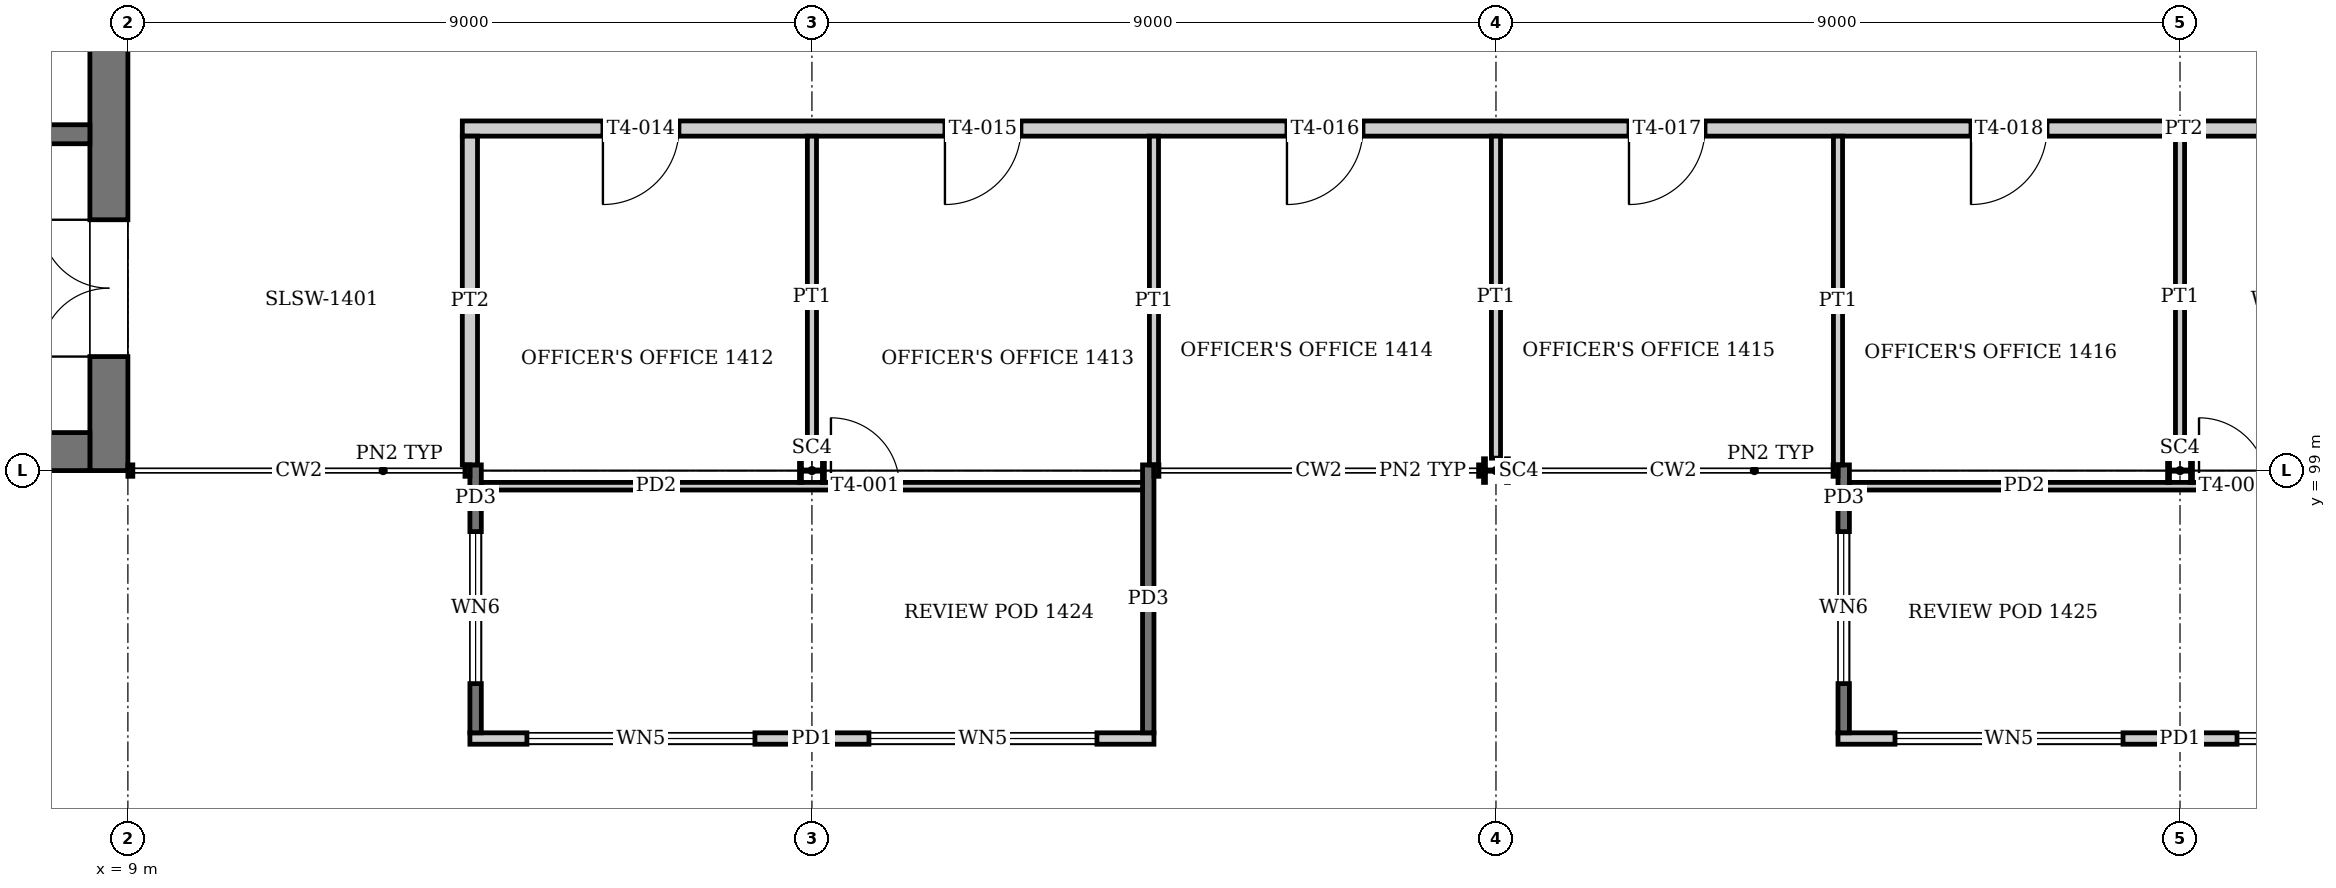
"""IFC4 building model, lengths in metres.
Left out: names, types, materials, properties, quantities, classifications, styles, units other than length and angle.
Written with IfcOpenShell. Run it as: python <this file> out.ifc"""

import sys

from ifc_helpers import new_model, si_unit, direction, frame, frame_2d, origin, origin_2d, place, context, subcontext, project, spatial, rectangle, i_section, extrude, element, fill, save


model = new_model("IFC4")
c1 = context("Model", 3, precision=1e-05, world=origin(), true_north=direction((0.0, 1.0)))
c2 = subcontext(c1, "Body", "Model", "MODEL_VIEW")
j1 = project(units=[si_unit("LENGTHUNIT", "METRE"), si_unit("PLANEANGLEUNIT", "RADIAN")], contexts=[c1])
p1 = place(None, origin())
s1 = spatial("IfcSite", under=j1, at=p1, CompositionType="ELEMENT")
p2 = place(p1, origin())
s2 = spatial("IfcBuilding", under=s1, at=p2, CompositionType="ELEMENT")
p3 = place(p2, frame((0.0, 0.0, 59.2)))
s3 = spatial("IfcBuildingStorey", under=s2, at=p3, CompositionType="ELEMENT", Elevation=59.2)
for number, where, z_axis, x_axis in (
    (1, (18.0, 99.0, 0.0), (0.0, 0.0, 1.0), (0.0, 1.0, 0.0)),
    (2, (27.0, 99.0, 0.0), (0.0, 0.0, 1.0), (0.0, 1.0, 0.0)),
    (3, (36.0, 99.0, 0.0), (0.0, 0.0, 1.0), (0.0, 1.0, 0.0)),
):
    element("IfcColumn", number, at=place(p3, frame(where, z_axis=z_axis, x_axis=x_axis)), inside=s3, PredefinedType="COLUMN", context=c2, shape_type="SweptSolid", body=[
        extrude(i_section(OverallWidth=0.311, OverallDepth=0.327, WebThickness=0.016, FlangeThickness=0.025, at=origin_2d()), origin(), (0.0, 0.0, 1.0), 4.0),
    ])
p4 = place(p3, frame((8.75, 99.0, 0.0), z_axis=(0.0, 0.0, 1.0), x_axis=(0.0, 1.0, 0.0)))
e4 = element("IfcWall", 4, at=p4, inside=s3, PredefinedType="SHEAR", context=c2, shape_type="SweptSolid", body=[
    extrude(rectangle(XDim=18.0, YDim=0.5, at=frame_2d((9.0, 0.0))), origin(), (0.0, 0.0, 1.0), 4.0),
])
p5 = place(p4, frame((1.5, 0.0, 0.0)))
e5 = element("IfcOpeningElement", 5, at=p5, cuts=e4, PredefinedType="OPENING", context=c2, shape_type="SweptSolid", body=[
    extrude(rectangle(XDim=1.8, YDim=2.1, at=frame_2d((0.9, 1.05))), frame((0.0, 0.26, 0.0), z_axis=(0.0, -1.0, 0.0), x_axis=(1.0, 0.0, 0.0)), (0.0, 0.0, 1.0), 0.52),
])
p6 = place(p4, frame((14.7, 0.0, 0.0)))
e6 = element("IfcOpeningElement", 6, at=p6, cuts=e4, PredefinedType="OPENING", context=c2, shape_type="SweptSolid", body=[
    extrude(rectangle(XDim=1.8, YDim=2.1, at=frame_2d((0.9, 1.05))), frame((0.0, 0.26, 0.0), z_axis=(0.0, -1.0, 0.0), x_axis=(1.0, 0.0, 0.0)), (0.0, 0.0, 1.0), 0.52),
])
p7 = place(p4, frame((7.5, 0.0, 0.0)))
e7 = element("IfcOpeningElement", 7, at=p7, cuts=e4, PredefinedType="OPENING", context=c2, shape_type="SweptSolid", body=[
    extrude(rectangle(XDim=1.8, YDim=2.1, at=frame_2d((0.9, 1.05))), frame((0.0, 0.26, 0.0), z_axis=(0.0, -1.0, 0.0), x_axis=(1.0, 0.0, 0.0)), (0.0, 0.0, 1.0), 0.52),
])
p8 = place(p3, frame((0.5, 99.25, 0.0), z_axis=(0.0, 0.0, 1.0), x_axis=(1.0, 0.0, 0.0)))
e8 = element("IfcWall", 8, at=p8, inside=s3, PredefinedType="SHEAR", context=c2, shape_type="SweptSolid", body=[
    extrude(rectangle(XDim=8.0, YDim=0.5, at=frame_2d((4.0, 0.0))), origin(), (0.0, 0.0, 1.0), 4.0),
])
p9 = place(p3, frame((13.5, 95.475, 0.0), z_axis=(0.0, 0.0, 1.0), x_axis=(1.0, 0.0, 0.0)))
e9 = element("IfcWall", 9, at=p9, inside=s3, PredefinedType="SOLIDWALL", context=c2, shape_type="SweptSolid", body=[
    extrude(rectangle(XDim=9.0, YDim=0.15, at=frame_2d((4.5, 0.0))), origin(), (0.0, 0.0, 1.0), 2.6),
])
p10 = place(p9, frame((0.75, 0.0, 0.9)))
e10 = element("IfcOpeningElement", 10, at=p10, cuts=e9, PredefinedType="OPENING", context=c2, shape_type="SweptSolid", body=[
    extrude(rectangle(XDim=3.0, YDim=1.4, at=frame_2d((1.5, 0.7))), frame((0.0, 0.085, 0.0), z_axis=(0.0, -1.0, 0.0), x_axis=(1.0, 0.0, 0.0)), (0.0, 0.0, 1.0), 0.17),
])
p11 = place(p9, frame((5.25, 0.0, 0.9)))
e11 = element("IfcOpeningElement", 11, at=p11, cuts=e9, PredefinedType="OPENING", context=c2, shape_type="SweptSolid", body=[
    extrude(rectangle(XDim=3.0, YDim=1.4, at=frame_2d((1.5, 0.7))), frame((0.0, 0.085, 0.0), z_axis=(0.0, -1.0, 0.0), x_axis=(1.0, 0.0, 0.0)), (0.0, 0.0, 1.0), 0.17),
])
p12 = place(p3, frame((13.575, 95.55, -0.15), z_axis=(0.0, 0.0, 1.0), x_axis=(0.0, 1.0, 0.0)))
e12 = element("IfcWall", 12, at=p12, inside=s3, PredefinedType="SOLIDWALL", context=c2, shape_type="SweptSolid", body=[
    extrude(rectangle(XDim=3.525, YDim=0.15, at=frame_2d((1.762, 0.0))), origin(), (0.0, 0.0, 1.0), 2.75),
])
p13 = place(p12, frame((0.647, 0.0, 1.05)))
e13 = element("IfcOpeningElement", 13, at=p13, cuts=e12, PredefinedType="OPENING", context=c2, shape_type="SweptSolid", body=[
    extrude(rectangle(XDim=2.0, YDim=1.4, at=frame_2d((1.0, 0.7))), frame((0.0, 0.085, 0.0), z_axis=(0.0, -1.0, 0.0), x_axis=(1.0, 0.0, 0.0)), (0.0, 0.0, 1.0), 0.17),
])
p14 = place(p3, frame((22.425, 95.55, -0.15), z_axis=(0.0, 0.0, 1.0), x_axis=(0.0, 1.0, 0.0)))
e14 = element("IfcWall", 14, at=p14, inside=s3, PredefinedType="SOLIDWALL", context=c2, shape_type="SweptSolid", body=[
    extrude(rectangle(XDim=3.525, YDim=0.15, at=frame_2d((1.762, 0.0))), origin(), (0.0, 0.0, 1.0), 2.75),
])
p15 = place(p3, frame((13.65, 98.794, 0.0), z_axis=(0.0, 0.0, 1.0), x_axis=(1.0, 0.0, 0.0)))
e15 = element("IfcWall", 15, at=p15, inside=s3, PredefinedType="PARTITIONING", context=c2, shape_type="SweptSolid", body=[
    extrude(rectangle(XDim=8.7, YDim=0.1, at=frame_2d((4.35, 0.0))), origin(), (0.0, 0.0, 1.0), 2.6),
])
p16 = place(p15, frame((4.6, 0.0, 0.0)))
e16 = element("IfcOpeningElement", 16, at=p16, cuts=e15, PredefinedType="OPENING", context=c2, shape_type="SweptSolid", body=[
    extrude(rectangle(XDim=0.9, YDim=2.1, at=frame_2d((0.45, 1.05))), frame((0.0, 0.06, 0.0), z_axis=(0.0, -1.0, 0.0), x_axis=(1.0, 0.0, 0.0)), (0.0, 0.0, 1.0), 0.12),
])
p17 = place(p3, frame((31.5, 95.475, 0.0), z_axis=(0.0, 0.0, 1.0), x_axis=(1.0, 0.0, 0.0)))
e17 = element("IfcWall", 17, at=p17, inside=s3, PredefinedType="SOLIDWALL", context=c2, shape_type="SweptSolid", body=[
    extrude(rectangle(XDim=9.0, YDim=0.15, at=frame_2d((4.5, 0.0))), origin(), (0.0, 0.0, 1.0), 2.6),
])
p18 = place(p17, frame((0.75, 0.0, 0.9)))
e18 = element("IfcOpeningElement", 18, at=p18, cuts=e17, PredefinedType="OPENING", context=c2, shape_type="SweptSolid", body=[
    extrude(rectangle(XDim=3.0, YDim=1.4, at=frame_2d((1.5, 0.7))), frame((0.0, 0.085, 0.0), z_axis=(0.0, -1.0, 0.0), x_axis=(1.0, 0.0, 0.0)), (0.0, 0.0, 1.0), 0.17),
])
p19 = place(p17, frame((5.25, 0.0, 0.9)))
e19 = element("IfcOpeningElement", 19, at=p19, cuts=e17, PredefinedType="OPENING", context=c2, shape_type="SweptSolid", body=[
    extrude(rectangle(XDim=3.0, YDim=1.4, at=frame_2d((1.5, 0.7))), frame((0.0, 0.085, 0.0), z_axis=(0.0, -1.0, 0.0), x_axis=(1.0, 0.0, 0.0)), (0.0, 0.0, 1.0), 0.17),
])
p20 = place(p3, frame((31.575, 95.55, -0.15), z_axis=(0.0, 0.0, 1.0), x_axis=(0.0, 1.0, 0.0)))
e20 = element("IfcWall", 20, at=p20, inside=s3, PredefinedType="SOLIDWALL", context=c2, shape_type="SweptSolid", body=[
    extrude(rectangle(XDim=3.525, YDim=0.15, at=frame_2d((1.762, 0.0))), origin(), (0.0, 0.0, 1.0), 2.75),
])
p21 = place(p20, frame((0.647, 0.0, 1.05)))
e21 = element("IfcOpeningElement", 21, at=p21, cuts=e20, PredefinedType="OPENING", context=c2, shape_type="SweptSolid", body=[
    extrude(rectangle(XDim=2.0, YDim=1.4, at=frame_2d((1.0, 0.7))), frame((0.0, 0.085, 0.0), z_axis=(0.0, -1.0, 0.0), x_axis=(1.0, 0.0, 0.0)), (0.0, 0.0, 1.0), 0.17),
])
p22 = place(p3, frame((31.65, 98.794, 0.0), z_axis=(0.0, 0.0, 1.0), x_axis=(1.0, 0.0, 0.0)))
e22 = element("IfcWall", 22, at=p22, inside=s3, PredefinedType="PARTITIONING", context=c2, shape_type="SweptSolid", body=[
    extrude(rectangle(XDim=8.7, YDim=0.1, at=frame_2d((4.35, 0.0))), origin(), (0.0, 0.0, 1.0), 2.6),
])
p23 = place(p22, frame((4.6, 0.0, 0.0)))
e23 = element("IfcOpeningElement", 23, at=p23, cuts=e22, PredefinedType="OPENING", context=c2, shape_type="SweptSolid", body=[
    extrude(rectangle(XDim=0.9, YDim=2.1, at=frame_2d((0.45, 1.05))), frame((0.0, 0.06, 0.0), z_axis=(0.0, -1.0, 0.0), x_axis=(1.0, 0.0, 0.0)), (0.0, 0.0, 1.0), 0.12),
])
p24 = place(p3, frame((8.5, 103.425, 0.0), z_axis=(0.0, 0.0, 1.0), x_axis=(-1.0, 0.0, 0.0)))
e24 = element("IfcWall", 24, at=p24, inside=s3, PredefinedType="SOLIDWALL", context=c2, shape_type="SweptSolid", body=[
    extrude(rectangle(XDim=8.0, YDim=0.25, at=frame_2d((4.0, 0.0))), origin(), (0.0, 0.0, 1.0), 3.75),
])
p25 = place(p3, frame((13.4, 103.5, 0.0), z_axis=(0.0, 0.0, 1.0), x_axis=(1.0, 0.0, 0.0)))
e25 = element("IfcWall", 25, at=p25, inside=s3, PredefinedType="PARTITIONING", context=c2, shape_type="SweptSolid", body=[
    extrude(rectangle(XDim=27.2, YDim=0.2, at=frame_2d((13.6, 0.0))), origin(), (0.0, 0.0, 1.0), 3.05),
])
p26 = place(p25, frame((1.85, 0.0, 0.0)))
e26 = element("IfcOpeningElement", 26, at=p26, cuts=e25, PredefinedType="OPENING", context=c2, shape_type="SweptSolid", body=[
    extrude(rectangle(XDim=1.0, YDim=2.1, at=frame_2d((0.5, 1.05))), frame((0.0, 0.11, 0.0), z_axis=(0.0, -1.0, 0.0), x_axis=(1.0, 0.0, 0.0)), (0.0, 0.0, 1.0), 0.22),
])
p27 = place(p25, frame((6.35, 0.0, 0.0)))
e27 = element("IfcOpeningElement", 27, at=p27, cuts=e25, PredefinedType="OPENING", context=c2, shape_type="SweptSolid", body=[
    extrude(rectangle(XDim=1.0, YDim=2.1, at=frame_2d((0.5, 1.05))), frame((0.0, 0.11, 0.0), z_axis=(0.0, -1.0, 0.0), x_axis=(1.0, 0.0, 0.0)), (0.0, 0.0, 1.0), 0.22),
])
p28 = place(p25, frame((10.85, 0.0, 0.0)))
e28 = element("IfcOpeningElement", 28, at=p28, cuts=e25, PredefinedType="OPENING", context=c2, shape_type="SweptSolid", body=[
    extrude(rectangle(XDim=1.0, YDim=2.1, at=frame_2d((0.5, 1.05))), frame((0.0, 0.11, 0.0), z_axis=(0.0, -1.0, 0.0), x_axis=(1.0, 0.0, 0.0)), (0.0, 0.0, 1.0), 0.22),
])
p29 = place(p25, frame((15.35, 0.0, 0.0)))
e29 = element("IfcOpeningElement", 29, at=p29, cuts=e25, PredefinedType="OPENING", context=c2, shape_type="SweptSolid", body=[
    extrude(rectangle(XDim=1.0, YDim=2.1, at=frame_2d((0.5, 1.05))), frame((0.0, 0.11, 0.0), z_axis=(0.0, -1.0, 0.0), x_axis=(1.0, 0.0, 0.0)), (0.0, 0.0, 1.0), 0.22),
])
p30 = place(p25, frame((19.85, 0.0, 0.0)))
e30 = element("IfcOpeningElement", 30, at=p30, cuts=e25, PredefinedType="OPENING", context=c2, shape_type="SweptSolid", body=[
    extrude(rectangle(XDim=1.0, YDim=2.1, at=frame_2d((0.5, 1.05))), frame((0.0, 0.11, 0.0), z_axis=(0.0, -1.0, 0.0), x_axis=(1.0, 0.0, 0.0)), (0.0, 0.0, 1.0), 0.22),
])
p31 = place(p25, frame((24.45, 0.0, 0.0)))
e31 = element("IfcOpeningElement", 31, at=p31, cuts=e25, PredefinedType="OPENING", context=c2, shape_type="SweptSolid", body=[
    extrude(rectangle(XDim=0.8, YDim=2.1, at=frame_2d((0.4, 1.05))), frame((0.0, 0.11, 0.0), z_axis=(0.0, -1.0, 0.0), x_axis=(1.0, 0.0, 0.0)), (0.0, 0.0, 1.0), 0.22),
])
p32 = place(p3, frame((13.5, 99.075, 0.0), z_axis=(0.0, 0.0, 1.0), x_axis=(0.0, 1.0, 0.0)))
e32 = element("IfcWall", 32, at=p32, inside=s3, PredefinedType="PARTITIONING", context=c2, shape_type="SweptSolid", body=[
    extrude(rectangle(XDim=4.325, YDim=0.2, at=frame_2d((2.163, 0.0))), origin(), (0.0, 0.0, 1.0), 3.05),
])
p33 = place(p3, frame((18.0, 99.164, 0.0), z_axis=(0.0, 0.0, 1.0), x_axis=(0.0, 1.0, 0.0)))
e33 = element("IfcWall", 33, at=p33, inside=s3, PredefinedType="PARTITIONING", context=c2, shape_type="SweptSolid", body=[
    extrude(rectangle(XDim=4.236, YDim=0.12, at=frame_2d((2.118, 0.0))), origin(), (0.0, 0.0, 1.0), 3.05),
])
p34 = place(p3, frame((22.5, 99.075, 0.0), z_axis=(0.0, 0.0, 1.0), x_axis=(0.0, 1.0, 0.0)))
e34 = element("IfcWall", 34, at=p34, inside=s3, PredefinedType="PARTITIONING", context=c2, shape_type="SweptSolid", body=[
    extrude(rectangle(XDim=4.325, YDim=0.12, at=frame_2d((2.163, 0.0))), origin(), (0.0, 0.0, 1.0), 3.05),
])
p35 = place(p3, frame((27.0, 99.164, 0.0), z_axis=(0.0, 0.0, 1.0), x_axis=(0.0, 1.0, 0.0)))
e35 = element("IfcWall", 35, at=p35, inside=s3, PredefinedType="PARTITIONING", context=c2, shape_type="SweptSolid", body=[
    extrude(rectangle(XDim=4.236, YDim=0.12, at=frame_2d((2.118, 0.0))), origin(), (0.0, 0.0, 1.0), 3.05),
])
p36 = place(p3, frame((31.5, 99.075, 0.0), z_axis=(0.0, 0.0, 1.0), x_axis=(0.0, 1.0, 0.0)))
e36 = element("IfcWall", 36, at=p36, inside=s3, PredefinedType="PARTITIONING", context=c2, shape_type="SweptSolid", body=[
    extrude(rectangle(XDim=4.325, YDim=0.12, at=frame_2d((2.163, 0.0))), origin(), (0.0, 0.0, 1.0), 3.05),
])
p37 = place(p3, frame((36.0, 99.164, 0.0), z_axis=(0.0, 0.0, 1.0), x_axis=(0.0, 1.0, 0.0)))
e37 = element("IfcWall", 37, at=p37, inside=s3, PredefinedType="PARTITIONING", context=c2, shape_type="SweptSolid", body=[
    extrude(rectangle(XDim=4.236, YDim=0.12, at=frame_2d((2.118, 0.0))), origin(), (0.0, 0.0, 1.0), 3.05),
])
p38 = place(p10, origin())
e38 = element("IfcWindow", 38, at=p38, inside=s3, PartitioningType="SINGLE_PANEL", PredefinedType="WINDOW", context=c2, shape_type="SweptSolid", body=[
    extrude(rectangle(XDim=3.0, YDim=1.4, at=frame_2d((1.5, 0.7))), frame((0.0, 0.03, 0.0), z_axis=(0.0, -1.0, 0.0), x_axis=(1.0, 0.0, 0.0)), (0.0, 0.0, 1.0), 0.06),
])
fill(e10, e38)
p39 = place(p11, origin())
e39 = element("IfcWindow", 39, at=p39, inside=s3, PartitioningType="SINGLE_PANEL", PredefinedType="WINDOW", context=c2, shape_type="SweptSolid", body=[
    extrude(rectangle(XDim=3.0, YDim=1.4, at=frame_2d((1.5, 0.7))), frame((0.0, 0.03, 0.0), z_axis=(0.0, -1.0, 0.0), x_axis=(1.0, 0.0, 0.0)), (0.0, 0.0, 1.0), 0.06),
])
fill(e11, e39)
p40 = place(p13, origin())
e40 = element("IfcWindow", 40, at=p40, inside=s3, PartitioningType="SINGLE_PANEL", PredefinedType="WINDOW", context=c2, shape_type="SweptSolid", body=[
    extrude(rectangle(XDim=2.0, YDim=1.4, at=frame_2d((1.0, 0.7))), frame((0.0, 0.03, 0.0), z_axis=(0.0, -1.0, 0.0), x_axis=(1.0, 0.0, 0.0)), (0.0, 0.0, 1.0), 0.06),
])
fill(e13, e40)
p41 = place(p16, origin())
e41 = element("IfcDoor", 41, at=p41, inside=s3, OperationType="SINGLE_SWING_LEFT", PredefinedType="DOOR", context=c2, shape_type="SweptSolid", body=[
    extrude(rectangle(XDim=0.9, YDim=2.1, at=frame_2d((0.45, 1.05))), frame((0.0, 0.025, 0.0), z_axis=(0.0, -1.0, 0.0), x_axis=(1.0, 0.0, 0.0)), (0.0, 0.0, 1.0), 0.05),
])
fill(e16, e41)
p42 = place(p18, origin())
e42 = element("IfcWindow", 42, at=p42, inside=s3, PartitioningType="SINGLE_PANEL", PredefinedType="WINDOW", context=c2, shape_type="SweptSolid", body=[
    extrude(rectangle(XDim=3.0, YDim=1.4, at=frame_2d((1.5, 0.7))), frame((0.0, 0.03, 0.0), z_axis=(0.0, -1.0, 0.0), x_axis=(1.0, 0.0, 0.0)), (0.0, 0.0, 1.0), 0.06),
])
fill(e18, e42)
p43 = place(p19, origin())
e43 = element("IfcWindow", 43, at=p43, inside=s3, PartitioningType="SINGLE_PANEL", PredefinedType="WINDOW", context=c2, shape_type="SweptSolid", body=[
    extrude(rectangle(XDim=3.0, YDim=1.4, at=frame_2d((1.5, 0.7))), frame((0.0, 0.03, 0.0), z_axis=(0.0, -1.0, 0.0), x_axis=(1.0, 0.0, 0.0)), (0.0, 0.0, 1.0), 0.06),
])
fill(e19, e43)
p44 = place(p21, origin())
e44 = element("IfcWindow", 44, at=p44, inside=s3, PartitioningType="SINGLE_PANEL", PredefinedType="WINDOW", context=c2, shape_type="SweptSolid", body=[
    extrude(rectangle(XDim=2.0, YDim=1.4, at=frame_2d((1.0, 0.7))), frame((0.0, 0.03, 0.0), z_axis=(0.0, -1.0, 0.0), x_axis=(1.0, 0.0, 0.0)), (0.0, 0.0, 1.0), 0.06),
])
fill(e21, e44)
p45 = place(p23, origin())
e45 = element("IfcDoor", 45, at=p45, inside=s3, OperationType="SINGLE_SWING_LEFT", PredefinedType="DOOR", context=c2, shape_type="SweptSolid", body=[
    extrude(rectangle(XDim=0.9, YDim=2.1, at=frame_2d((0.45, 1.05))), frame((0.0, 0.025, 0.0), z_axis=(0.0, -1.0, 0.0), x_axis=(1.0, 0.0, 0.0)), (0.0, 0.0, 1.0), 0.05),
])
fill(e23, e45)
p46 = place(p26, frame((1.0, 0.0, 0.0), z_axis=(0.0, 0.0, 1.0), x_axis=(-1.0, 0.0, 0.0)))
e46 = element("IfcDoor", 46, at=p46, inside=s3, OperationType="SINGLE_SWING_RIGHT", PredefinedType="DOOR", context=c2, shape_type="SweptSolid", body=[
    extrude(rectangle(XDim=1.0, YDim=2.1, at=frame_2d((0.5, 1.05))), frame((0.0, 0.025, 0.0), z_axis=(0.0, -1.0, 0.0), x_axis=(1.0, 0.0, 0.0)), (0.0, 0.0, 1.0), 0.05),
])
fill(e26, e46)
p47 = place(p27, frame((1.0, 0.0, 0.0), z_axis=(0.0, 0.0, 1.0), x_axis=(-1.0, 0.0, 0.0)))
e47 = element("IfcDoor", 47, at=p47, inside=s3, OperationType="SINGLE_SWING_RIGHT", PredefinedType="DOOR", context=c2, shape_type="SweptSolid", body=[
    extrude(rectangle(XDim=1.0, YDim=2.1, at=frame_2d((0.5, 1.05))), frame((0.0, 0.025, 0.0), z_axis=(0.0, -1.0, 0.0), x_axis=(1.0, 0.0, 0.0)), (0.0, 0.0, 1.0), 0.05),
])
fill(e27, e47)
p48 = place(p28, frame((1.0, 0.0, 0.0), z_axis=(0.0, 0.0, 1.0), x_axis=(-1.0, 0.0, 0.0)))
e48 = element("IfcDoor", 48, at=p48, inside=s3, OperationType="SINGLE_SWING_RIGHT", PredefinedType="DOOR", context=c2, shape_type="SweptSolid", body=[
    extrude(rectangle(XDim=1.0, YDim=2.1, at=frame_2d((0.5, 1.05))), frame((0.0, 0.025, 0.0), z_axis=(0.0, -1.0, 0.0), x_axis=(1.0, 0.0, 0.0)), (0.0, 0.0, 1.0), 0.05),
])
fill(e28, e48)
p49 = place(p29, frame((1.0, 0.0, 0.0), z_axis=(0.0, 0.0, 1.0), x_axis=(-1.0, 0.0, 0.0)))
e49 = element("IfcDoor", 49, at=p49, inside=s3, OperationType="SINGLE_SWING_RIGHT", PredefinedType="DOOR", context=c2, shape_type="SweptSolid", body=[
    extrude(rectangle(XDim=1.0, YDim=2.1, at=frame_2d((0.5, 1.05))), frame((0.0, 0.025, 0.0), z_axis=(0.0, -1.0, 0.0), x_axis=(1.0, 0.0, 0.0)), (0.0, 0.0, 1.0), 0.05),
])
fill(e29, e49)
p50 = place(p30, frame((1.0, 0.0, 0.0), z_axis=(0.0, 0.0, 1.0), x_axis=(-1.0, 0.0, 0.0)))
e50 = element("IfcDoor", 50, at=p50, inside=s3, OperationType="SINGLE_SWING_RIGHT", PredefinedType="DOOR", context=c2, shape_type="SweptSolid", body=[
    extrude(rectangle(XDim=1.0, YDim=2.1, at=frame_2d((0.5, 1.05))), frame((0.0, 0.025, 0.0), z_axis=(0.0, -1.0, 0.0), x_axis=(1.0, 0.0, 0.0)), (0.0, 0.0, 1.0), 0.05),
])
fill(e30, e50)
p51 = place(p5, origin())
e51 = element("IfcDoor", 51, at=p51, inside=s3, OperationType="DOUBLE_DOOR_SINGLE_SWING", PredefinedType="DOOR", context=c2, shape_type="SweptSolid", body=[
    extrude(rectangle(XDim=1.8, YDim=2.1, at=frame_2d((0.9, 1.05))), frame((0.0, 0.025, 0.0), z_axis=(0.0, -1.0, 0.0), x_axis=(1.0, 0.0, 0.0)), (0.0, 0.0, 1.0), 0.05),
])
fill(e5, e51)
save(model, sys.argv[1])
